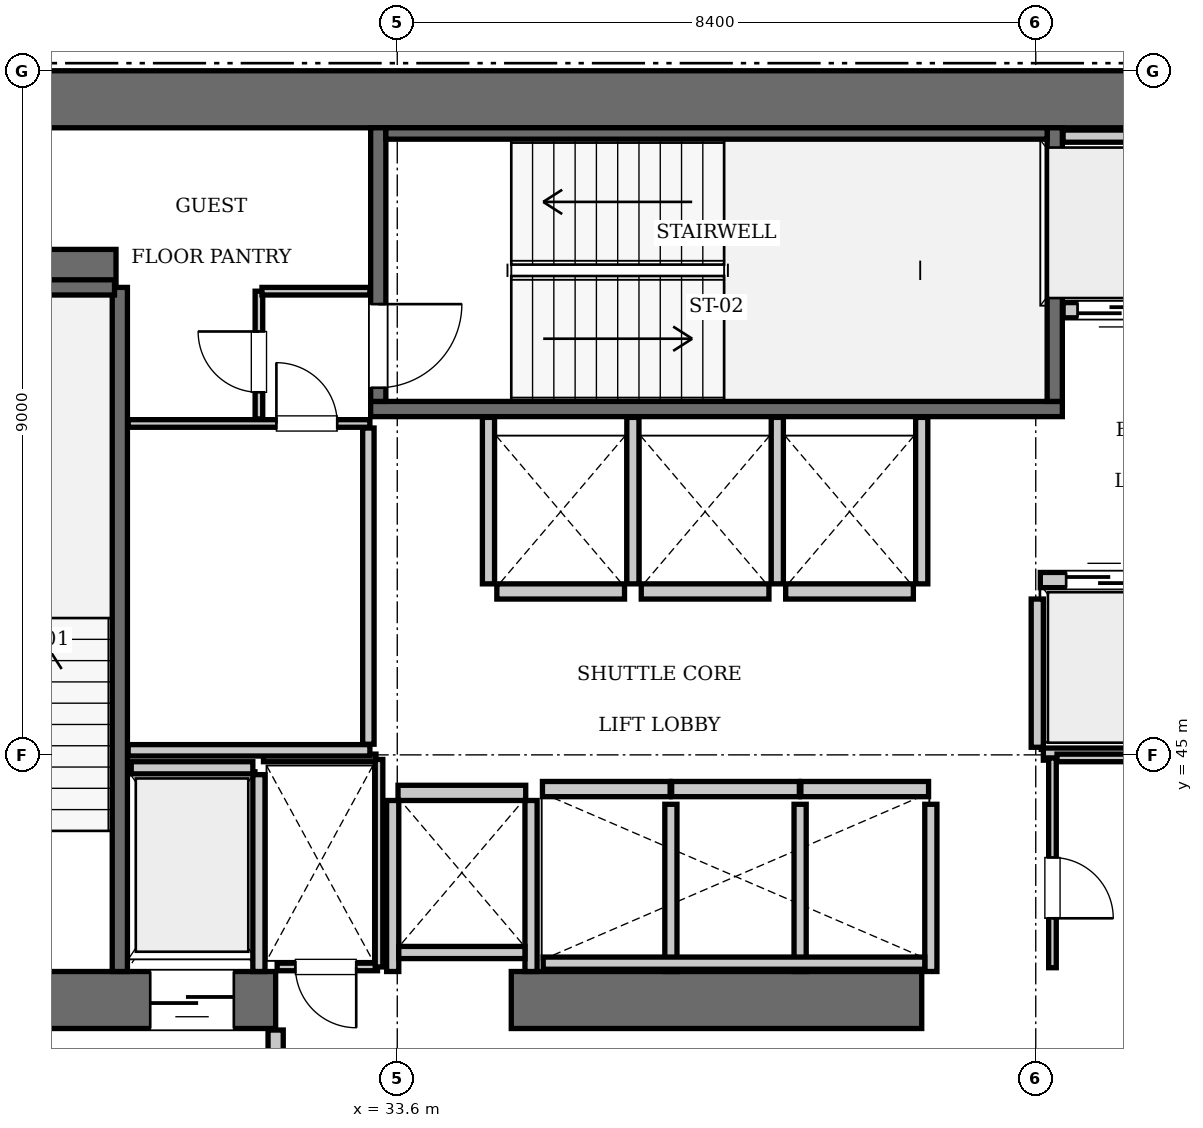
"""IFC4 building model, lengths in metres.
Left out: names, types, materials, properties, quantities, classifications, styles, units other than length and angle.
Written with IfcOpenShell. Run it as: python <this file> out.ifc"""

import sys

from ifc_helpers import new_model, si_unit, direction, frame, frame_2d, origin, place, context, subcontext, project, spatial, rectangle, extrude, element, fill, save


model = new_model("IFC4")
c1 = context("Model", 3, precision=1e-05, world=origin(), true_north=direction((0.0, 1.0)))
c2 = subcontext(c1, "Body", "Model", "MODEL_VIEW")
j1 = project(units=[si_unit("LENGTHUNIT", "METRE"), si_unit("PLANEANGLEUNIT", "RADIAN")], contexts=[c1])
p1 = place(None, origin())
s1 = spatial("IfcSite", under=j1, at=p1, CompositionType="ELEMENT")
p2 = place(p1, origin())
s2 = spatial("IfcBuilding", under=s1, at=p2, CompositionType="ELEMENT")
p3 = place(p2, frame((0.0, 0.0, 212.1)))
s3 = spatial("IfcBuildingStorey", under=s2, at=p3, CompositionType="ELEMENT", Elevation=212.1)
p4 = place(p3, frame((25.2, 53.625, 0.0), z_axis=(0.0, 0.0, 1.0), x_axis=(1.0, 0.0, 0.0)))
e1 = element("IfcWall", 1, at=p4, inside=s3, PredefinedType="SHEAR", context=c2, shape_type="SweptSolid", body=[
    extrude(rectangle(XDim=25.2, YDim=0.75, at=frame_2d((12.6, 0.0))), origin(), (0.0, 0.0, 1.0), 3.85),
])
p5 = place(p3, frame((25.2, 41.775, 0.0), z_axis=(0.0, 0.0, 1.0), x_axis=(1.0, 0.0, 0.0)))
e2 = element("IfcWall", 2, at=p5, inside=s3, PredefinedType="SHEAR", context=c2, shape_type="SweptSolid", body=[
    extrude(rectangle(XDim=6.8, YDim=0.75, at=frame_2d((3.4, 0.0))), origin(), (0.0, 0.0, 1.0), 3.85),
])
p6 = place(p5, frame((1.65, 0.0, 0.0)))
e3 = element("IfcOpeningElement", 3, at=p6, cuts=e2, PredefinedType="OPENING", context=c2, shape_type="SweptSolid", body=[
    extrude(rectangle(XDim=1.15, YDim=2.15, at=frame_2d((0.575, 1.075))), frame((0.0, 0.385, 0.0), z_axis=(0.0, -1.0, 0.0), x_axis=(1.0, 0.0, 0.0)), (0.0, 0.0, 1.0), 0.77),
])
p7 = place(p5, frame((5.15, 0.0, 0.0)))
e4 = element("IfcOpeningElement", 4, at=p7, cuts=e2, PredefinedType="OPENING", context=c2, shape_type="SweptSolid", body=[
    extrude(rectangle(XDim=1.1, YDim=2.2, at=frame_2d((0.55, 1.1))), frame((0.0, 0.385, 0.0), z_axis=(0.0, -1.0, 0.0), x_axis=(1.0, 0.0, 0.0)), (0.0, 0.0, 1.0), 0.77),
])
p8 = place(p3, frame((35.1, 41.775, 0.0), z_axis=(0.0, 0.0, 1.0), x_axis=(1.0, 0.0, 0.0)))
e5 = element("IfcWall", 5, at=p8, inside=s3, PredefinedType="SHEAR", context=c2, shape_type="SweptSolid", body=[
    extrude(rectangle(XDim=5.4, YDim=0.75, at=frame_2d((2.7, 0.0))), origin(), (0.0, 0.0, 1.0), 3.85),
])
p9 = place(p3, frame((25.95, 51.4, 0.0), z_axis=(0.0, 0.0, 1.0), x_axis=(1.0, 0.0, 0.0)))
e6 = element("IfcWall", 6, at=p9, inside=s3, PredefinedType="SHEAR", context=c2, shape_type="SweptSolid", body=[
    extrude(rectangle(XDim=3.95, YDim=0.5, at=frame_2d((1.975, 0.0))), origin(), (0.0, 0.0, 1.0), 3.85),
])
p10 = place(p3, frame((29.95, 42.15, 0.0), z_axis=(0.0, 0.0, 1.0), x_axis=(0.0, 1.0, 0.0)))
e7 = element("IfcWall", 7, at=p10, inside=s3, PredefinedType="SOLIDWALL", context=c2, shape_type="SweptSolid", body=[
    extrude(rectangle(XDim=9.0, YDim=0.2, at=frame_2d((4.5, 0.0))), origin(), (0.0, 0.0, 1.0), 3.61),
])
p11 = place(p3, frame((26.38, 51.15, 0.0), z_axis=(0.0, 0.0, 1.0), x_axis=(1.0, 0.0, 0.0)))
e8 = element("IfcWall", 8, at=p11, inside=s3, PredefinedType="SOLIDWALL", context=c2, shape_type="SweptSolid", body=[
    extrude(rectangle(XDim=3.5, YDim=0.2, at=frame_2d((1.75, 0.0))), origin(), (0.0, 0.0, 1.0), 3.61),
])
p12 = place(p3, frame((33.25, 49.55, 0.0), z_axis=(0.0, 0.0, 1.0), x_axis=(1.0, 0.0, 0.0)))
e9 = element("IfcWall", 9, at=p12, inside=s3, PredefinedType="SOLIDWALL", context=c2, shape_type="SweptSolid", body=[
    extrude(rectangle(XDim=9.1, YDim=0.2, at=frame_2d((4.55, 0.0))), origin(), (0.0, 0.0, 1.0), 3.61),
])
p13 = place(p3, frame((42.25, 49.65, 0.0), z_axis=(0.0, 0.0, 1.0), x_axis=(0.0, 1.0, 0.0)))
e10 = element("IfcWall", 10, at=p13, inside=s3, PredefinedType="SOLIDWALL", context=c2, shape_type="SweptSolid", body=[
    extrude(rectangle(XDim=3.6, YDim=0.2, at=frame_2d((1.8, 0.0))), origin(), (0.0, 0.0, 1.0), 3.61),
])
p14 = place(p3, frame((33.35, 49.65, 0.0), z_axis=(0.0, 0.0, 1.0), x_axis=(0.0, 1.0, 0.0)))
e11 = element("IfcWall", 11, at=p14, inside=s3, PredefinedType="SOLIDWALL", context=c2, shape_type="SweptSolid", body=[
    extrude(rectangle(XDim=3.6, YDim=0.2, at=frame_2d((1.8, 0.0))), origin(), (0.0, 0.0, 1.0), 3.61),
])
p15 = place(p14, frame((0.18, 0.0, 0.0)))
e12 = element("IfcOpeningElement", 12, at=p15, cuts=e11, PredefinedType="OPENING", context=c2, shape_type="SweptSolid", body=[
    extrude(rectangle(XDim=1.1, YDim=2.15, at=frame_2d((0.55, 1.075))), frame((0.0, 0.11, 0.0), z_axis=(0.0, -1.0, 0.0), x_axis=(1.0, 0.0, 0.0)), (0.0, 0.0, 1.0), 0.22),
])
p16 = place(p3, frame((33.45, 53.175, 0.0), z_axis=(0.0, 0.0, 1.0), x_axis=(1.0, 0.0, 0.0)))
e13 = element("IfcWall", 13, at=p16, inside=s3, PredefinedType="SOLIDWALL", context=c2, shape_type="SweptSolid", body=[
    extrude(rectangle(XDim=8.7, YDim=0.15, at=frame_2d((4.35, 0.0))), origin(), (0.0, 0.0, 1.0), 3.61),
])
p17 = place(p3, frame((42.06, 47.3, 0.0), z_axis=(0.0, 0.0, 1.0), x_axis=(1.0, 0.0, 0.0)))
e14 = element("IfcWall", 14, at=p17, inside=s3, PredefinedType="SOLIDWALL", context=c2, shape_type="SweptSolid", body=[
    extrude(rectangle(XDim=1.68, YDim=0.2, at=frame_2d((0.84, 0.0))), origin(), (0.0, 0.0, 1.0), 3.61),
])
p18 = place(p17, frame((0.34, 0.0, 0.0)))
e15 = element("IfcOpeningElement", 15, at=p18, cuts=e14, PredefinedType="OPENING", context=c2, shape_type="SweptSolid", body=[
    extrude(rectangle(XDim=1.0, YDim=2.15, at=frame_2d((0.5, 1.075))), frame((0.0, 0.11, 0.0), z_axis=(0.0, -1.0, 0.0), x_axis=(1.0, 0.0, 0.0)), (0.0, 0.0, 1.0), 0.22),
])
p19 = place(p3, frame((42.36, 50.85, 0.0), z_axis=(0.0, 0.0, 1.0), x_axis=(1.0, 0.0, 0.0)))
e16 = element("IfcWall", 16, at=p19, inside=s3, PredefinedType="SOLIDWALL", context=c2, shape_type="SweptSolid", body=[
    extrude(rectangle(XDim=1.38, YDim=0.2, at=frame_2d((0.69, 0.0))), origin(), (0.0, 0.0, 1.0), 3.61),
])
p20 = place(p19, frame((0.19, 0.0, 0.0)))
e17 = element("IfcOpeningElement", 17, at=p20, cuts=e16, PredefinedType="OPENING", context=c2, shape_type="SweptSolid", body=[
    extrude(rectangle(XDim=1.0, YDim=2.15, at=frame_2d((0.5, 1.075))), frame((0.0, 0.11, 0.0), z_axis=(0.0, -1.0, 0.0), x_axis=(1.0, 0.0, 0.0)), (0.0, 0.0, 1.0), 0.22),
])
for number, where, z_axis, x_axis in (
    (18, (35.51, 44.55, 0.0), (0.0, 0.0, 1.0), (1.0, 0.0, 0.0)),
    (19, (37.21, 44.55, 0.0), (0.0, 0.0, 1.0), (1.0, 0.0, 0.0)),
):
    element("IfcWall", number, at=place(p3, frame(where, z_axis=z_axis, x_axis=x_axis)), inside=s3, PredefinedType="SOLIDWALL", context=c2, shape_type="SweptSolid", body=[
        extrude(rectangle(XDim=1.68, YDim=0.2, at=frame_2d((0.84, 0.0))), origin(), (0.0, 0.0, 1.0), 3.61),
    ])
for number, where, z_axis, x_axis in (
    (20, (38.91, 44.55, 0.0), (0.0, 0.0, 1.0), (1.0, 0.0, 0.0)),
    (21, (34.91, 47.15, 0.0), (0.0, 0.0, 1.0), (1.0, 0.0, 0.0)),
):
    element("IfcWall", number, at=place(p3, frame(where, z_axis=z_axis, x_axis=x_axis)), inside=s3, PredefinedType="SOLIDWALL", context=c2, shape_type="SweptSolid", body=[
        extrude(rectangle(XDim=1.68, YDim=0.2, at=frame_2d((0.84, 0.0))), origin(), (0.0, 0.0, 1.0), 3.61),
    ])
for number, where, z_axis, x_axis in (
    (22, (36.81, 47.15, 0.0), (0.0, 0.0, 1.0), (1.0, 0.0, 0.0)),
    (23, (38.71, 47.15, 0.0), (0.0, 0.0, 1.0), (1.0, 0.0, 0.0)),
    (24, (33.61, 44.5, 0.0), (0.0, 0.0, 1.0), (1.0, 0.0, 0.0)),
):
    element("IfcWall", number, at=place(p3, frame(where, z_axis=z_axis, x_axis=x_axis)), inside=s3, PredefinedType="SOLIDWALL", context=c2, shape_type="SweptSolid", body=[
        extrude(rectangle(XDim=1.68, YDim=0.2, at=frame_2d((0.84, 0.0))), origin(), (0.0, 0.0, 1.0), 3.61),
    ])
p21 = place(p3, frame((30.1, 44.83, 0.0), z_axis=(0.0, 0.0, 1.0), x_axis=(1.0, 0.0, 0.0)))
e25 = element("IfcWall", 25, at=p21, inside=s3, PredefinedType="SOLIDWALL", context=c2, shape_type="SweptSolid", body=[
    extrude(rectangle(XDim=1.6, YDim=0.16, at=frame_2d((0.8, 0.0))), origin(), (0.0, 0.0, 1.0), 3.61),
])
p22 = place(p3, frame((31.78, 42.15, 0.0), z_axis=(0.0, 0.0, 1.0), x_axis=(0.0, 1.0, 0.0)))
e26 = element("IfcWall", 26, at=p22, inside=s3, PredefinedType="SOLIDWALL", context=c2, shape_type="SweptSolid", body=[
    extrude(rectangle(XDim=2.59, YDim=0.16, at=frame_2d((1.295, 0.0))), origin(), (0.0, 0.0, 1.0), 3.61),
])
p23 = place(p3, frame((42.02, 45.1, 0.0), z_axis=(0.0, 0.0, 1.0), x_axis=(0.0, 1.0, 0.0)))
e27 = element("IfcWall", 27, at=p23, inside=s3, PredefinedType="SOLIDWALL", context=c2, shape_type="SweptSolid", body=[
    extrude(rectangle(XDim=1.95, YDim=0.16, at=frame_2d((0.975, 0.0))), origin(), (0.0, 0.0, 1.0), 3.61),
])
p24 = place(p3, frame((42.1, 45.01, 0.0), z_axis=(0.0, 0.0, 1.0), x_axis=(1.0, 0.0, 0.0)))
e28 = element("IfcWall", 28, at=p24, inside=s3, PredefinedType="SOLIDWALL", context=c2, shape_type="SweptSolid", body=[
    extrude(rectangle(XDim=3.45, YDim=0.16, at=frame_2d((1.725, 0.0))), origin(), (0.0, 0.0, 1.0), 3.61),
])
p25 = place(p3, frame((42.36, 53.14, 0.0), z_axis=(0.0, 0.0, 1.0), x_axis=(1.0, 0.0, 0.0)))
e29 = element("IfcWall", 29, at=p25, inside=s3, PredefinedType="SOLIDWALL", context=c2, shape_type="SweptSolid", body=[
    extrude(rectangle(XDim=3.14, YDim=0.16, at=frame_2d((1.57, 0.0))), origin(), (0.0, 0.0, 1.0), 3.61),
])
for number, where, z_axis, x_axis in (
    (30, (37.2, 42.15, 0.0), (0.0, 0.0, 1.0), (0.0, 1.0, 0.0)),
    (31, (38.9, 42.15, 0.0), (0.0, 0.0, 1.0), (0.0, 1.0, 0.0)),
    (32, (40.62, 42.15, 0.0), (0.0, 0.0, 1.0), (0.0, 1.0, 0.0)),
):
    element("IfcWall", number, at=place(p3, frame(where, z_axis=z_axis, x_axis=x_axis)), inside=s3, PredefinedType="SOLIDWALL", context=c2, shape_type="SweptSolid", body=[
        extrude(rectangle(XDim=2.2, YDim=0.16, at=frame_2d((1.1, 0.0))), origin(), (0.0, 0.0, 1.0), 3.61),
    ])
p26 = place(p3, frame((35.52, 42.26, 0.0), z_axis=(0.0, 0.0, 1.0), x_axis=(1.0, 0.0, 0.0)))
e33 = element("IfcWall", 33, at=p26, inside=s3, PredefinedType="SOLIDWALL", context=c2, shape_type="SweptSolid", body=[
    extrude(rectangle(XDim=5.02, YDim=0.16, at=frame_2d((2.51, 0.0))), origin(), (0.0, 0.0, 1.0), 3.61),
])
for number, where, z_axis, x_axis in (
    (34, (34.8, 47.25, 0.0), (0.0, 0.0, 1.0), (0.0, 1.0, 0.0)),
    (35, (36.7, 47.25, 0.0), (0.0, 0.0, 1.0), (0.0, 1.0, 0.0)),
    (36, (38.6, 47.25, 0.0), (0.0, 0.0, 1.0), (0.0, 1.0, 0.0)),
    (37, (40.5, 47.25, 0.0), (0.0, 0.0, 1.0), (0.0, 1.0, 0.0)),
):
    element("IfcWall", number, at=place(p3, frame(where, z_axis=z_axis, x_axis=x_axis)), inside=s3, PredefinedType="SOLIDWALL", context=c2, shape_type="SweptSolid", body=[
        extrude(rectangle(XDim=2.19, YDim=0.16, at=frame_2d((1.095, 0.0))), origin(), (0.0, 0.0, 1.0), 3.61),
    ])
for number, where, z_axis, x_axis in (
    (38, (33.54, 42.15, 0.0), (0.0, 0.0, 1.0), (0.0, 1.0, 0.0)),
    (39, (35.36, 42.15, 0.0), (0.0, 0.0, 1.0), (0.0, 1.0, 0.0)),
):
    element("IfcWall", number, at=place(p3, frame(where, z_axis=z_axis, x_axis=x_axis)), inside=s3, PredefinedType="SOLIDWALL", context=c2, shape_type="SweptSolid", body=[
        extrude(rectangle(XDim=2.25, YDim=0.16, at=frame_2d((1.125, 0.0))), origin(), (0.0, 0.0, 1.0), 3.61),
    ])
p27 = place(p3, frame((33.62, 42.4, 0.0), z_axis=(0.0, 0.0, 1.0), x_axis=(1.0, 0.0, 0.0)))
e40 = element("IfcWall", 40, at=p27, inside=s3, PredefinedType="SOLIDWALL", context=c2, shape_type="SweptSolid", body=[
    extrude(rectangle(XDim=1.66, YDim=0.16, at=frame_2d((0.83, 0.0))), origin(), (0.0, 0.0, 1.0), 3.61),
])
p28 = place(p3, frame((32.0, 38.31, 0.0), z_axis=(0.0, 0.0, 1.0), x_axis=(0.0, 1.0, 0.0)))
e41 = element("IfcWall", 41, at=p28, inside=s3, PredefinedType="PARTITIONING", context=c2, shape_type="SweptSolid", body=[
    extrude(rectangle(XDim=3.07, YDim=0.2, at=frame_2d((1.535, 0.0))), origin(), (0.0, 0.0, 1.0), 3.61),
])
p29 = place(p3, frame((32.02, 42.21, 0.0), z_axis=(0.0, 0.0, 1.0), x_axis=(1.0, 0.0, 0.0)))
e42 = element("IfcWall", 42, at=p29, inside=s3, PredefinedType="PARTITIONING", context=c2, shape_type="SweptSolid", body=[
    extrude(rectangle(XDim=1.32, YDim=0.1, at=frame_2d((0.66, 0.0))), origin(), (0.0, 0.0, 1.0), 3.61),
])
p30 = place(p29, frame((0.24, 0.0, 0.0)))
e43 = element("IfcOpeningElement", 43, at=p30, cuts=e42, PredefinedType="OPENING", context=c2, shape_type="SweptSolid", body=[
    extrude(rectangle(XDim=0.8, YDim=2.05, at=frame_2d((0.4, 1.025))), frame((0.0, 0.06, 0.0), z_axis=(0.0, -1.0, 0.0), x_axis=(1.0, 0.0, 0.0)), (0.0, 0.0, 1.0), 0.12),
])
p31 = place(p3, frame((31.84, 44.96, 0.0), z_axis=(0.0, 0.0, 1.0), x_axis=(1.0, 0.0, 0.0)))
e44 = element("IfcWall", 44, at=p31, inside=s3, PredefinedType="PARTITIONING", context=c2, shape_type="SweptSolid", body=[
    extrude(rectangle(XDim=1.48, YDim=0.1, at=frame_2d((0.74, 0.0))), origin(), (0.0, 0.0, 1.0), 3.61),
])
p32 = place(p3, frame((33.36, 42.21, 0.0), z_axis=(0.0, 0.0, 1.0), x_axis=(0.0, 1.0, 0.0)))
e45 = element("IfcWall", 45, at=p32, inside=s3, PredefinedType="PARTITIONING", context=c2, shape_type="SweptSolid", body=[
    extrude(rectangle(XDim=2.73, YDim=0.1, at=frame_2d((1.365, 0.0))), origin(), (0.0, 0.0, 1.0), 3.61),
])
p33 = place(p3, frame((42.22, 42.2, 0.0), z_axis=(0.0, 0.0, 1.0), x_axis=(0.0, 1.0, 0.0)))
e46 = element("IfcWall", 46, at=p33, inside=s3, PredefinedType="PARTITIONING", context=c2, shape_type="SweptSolid", body=[
    extrude(rectangle(XDim=2.76, YDim=0.1, at=frame_2d((1.38, 0.0))), origin(), (0.0, 0.0, 1.0), 3.61),
])
p34 = place(p33, frame((0.65, 0.0, 0.0)))
e47 = element("IfcOpeningElement", 47, at=p34, cuts=e46, PredefinedType="OPENING", context=c2, shape_type="SweptSolid", body=[
    extrude(rectangle(XDim=0.8, YDim=2.05, at=frame_2d((0.4, 1.025))), frame((0.0, 0.06, 0.0), z_axis=(0.0, -1.0, 0.0), x_axis=(1.0, 0.0, 0.0)), (0.0, 0.0, 1.0), 0.12),
])
p35 = place(p3, frame((42.28, 44.96, 0.0), z_axis=(0.0, 0.0, 1.0), x_axis=(1.0, 0.0, 0.0)))
e48 = element("IfcWall", 48, at=p35, inside=s3, PredefinedType="PARTITIONING", context=c2, shape_type="SweptSolid", body=[
    extrude(rectangle(XDim=1.3, YDim=0.1, at=frame_2d((0.65, 0.0))), origin(), (0.0, 0.0, 1.0), 3.61),
])
p36 = place(p3, frame((30.06, 45.06, 0.0), z_axis=(0.0, 0.0, 1.0), x_axis=(1.0, 0.0, 0.0)))
e49 = element("IfcWall", 49, at=p36, inside=s3, PredefinedType="PARTITIONING", context=c2, shape_type="SweptSolid", body=[
    extrude(rectangle(XDim=3.18, YDim=0.15, at=frame_2d((1.59, 0.0))), origin(), (0.0, 0.0, 1.0), 3.61),
])
p37 = place(p3, frame((33.22, 45.14, 0.0), z_axis=(0.0, 0.0, 1.0), x_axis=(0.0, 1.0, 0.0)))
e50 = element("IfcWall", 50, at=p37, inside=s3, PredefinedType="PARTITIONING", context=c2, shape_type="SweptSolid", body=[
    extrude(rectangle(XDim=4.16, YDim=0.15, at=frame_2d((2.08, 0.0))), origin(), (0.0, 0.0, 1.0), 3.61),
])
p38 = place(p3, frame((30.06, 49.36, 0.0), z_axis=(0.0, 0.0, 1.0), x_axis=(1.0, 0.0, 0.0)))
e51 = element("IfcWall", 51, at=p38, inside=s3, PredefinedType="PARTITIONING", context=c2, shape_type="SweptSolid", body=[
    extrude(rectangle(XDim=3.18, YDim=0.1, at=frame_2d((1.59, 0.0))), origin(), (0.0, 0.0, 1.0), 3.61),
])
p39 = place(p38, frame((1.95, 0.0, 0.0)))
e52 = element("IfcOpeningElement", 52, at=p39, cuts=e51, PredefinedType="OPENING", context=c2, shape_type="SweptSolid", body=[
    extrude(rectangle(XDim=0.8, YDim=2.05, at=frame_2d((0.4, 1.025))), frame((0.0, 0.06, 0.0), z_axis=(0.0, -1.0, 0.0), x_axis=(1.0, 0.0, 0.0)), (0.0, 0.0, 1.0), 0.12),
])
p40 = place(p3, frame((31.78, 49.42, 0.0), z_axis=(0.0, 0.0, 1.0), x_axis=(0.0, 1.0, 0.0)))
e53 = element("IfcWall", 53, at=p40, inside=s3, PredefinedType="PARTITIONING", context=c2, shape_type="SweptSolid", body=[
    extrude(rectangle(XDim=1.68, YDim=0.1, at=frame_2d((0.84, 0.0))), origin(), (0.0, 0.0, 1.0), 3.61),
])
p41 = place(p40, frame((0.35, 0.0, 0.0)))
e54 = element("IfcOpeningElement", 54, at=p41, cuts=e53, PredefinedType="OPENING", context=c2, shape_type="SweptSolid", body=[
    extrude(rectangle(XDim=0.8, YDim=2.05, at=frame_2d((0.4, 1.025))), frame((0.0, 0.06, 0.0), z_axis=(0.0, -1.0, 0.0), x_axis=(1.0, 0.0, 0.0)), (0.0, 0.0, 1.0), 0.12),
])
p42 = place(p3, frame((31.82, 51.1, 0.0), z_axis=(0.0, 0.0, 1.0), x_axis=(1.0, 0.0, 0.0)))
e55 = element("IfcWall", 55, at=p42, inside=s3, PredefinedType="PARTITIONING", context=c2, shape_type="SweptSolid", body=[
    extrude(rectangle(XDim=1.42, YDim=0.1, at=frame_2d((0.71, 0.0))), origin(), (0.0, 0.0, 1.0), 3.61),
])
p43 = place(p15, frame((1.1, 0.0, 0.0), z_axis=(0.0, 0.0, 1.0), x_axis=(-1.0, 0.0, 0.0)))
e56 = element("IfcDoor", 56, at=p43, inside=s3, OperationType="SINGLE_SWING_LEFT", PredefinedType="DOOR", context=c2, shape_type="SweptSolid", body=[
    extrude(rectangle(XDim=1.1, YDim=2.15, at=frame_2d((0.55, 1.075))), frame((0.0, 0.025, 0.0), z_axis=(0.0, -1.0, 0.0), x_axis=(1.0, 0.0, 0.0)), (0.0, 0.0, 1.0), 0.05),
])
fill(e12, e56)
p44 = place(p18, origin())
e57 = element("IfcDoor", 57, at=p44, inside=s3, OperationType="SLIDING_TO_LEFT", PredefinedType="DOOR", context=c2, shape_type="SweptSolid", body=[
    extrude(rectangle(XDim=1.0, YDim=2.15, at=frame_2d((0.5, 1.075))), frame((0.0, 0.025, 0.0), z_axis=(0.0, -1.0, 0.0), x_axis=(1.0, 0.0, 0.0)), (0.0, 0.0, 1.0), 0.05),
])
fill(e15, e57)
p45 = place(p20, frame((1.0, 0.0, 0.0), z_axis=(0.0, 0.0, 1.0), x_axis=(-1.0, 0.0, 0.0)))
e58 = element("IfcDoor", 58, at=p45, inside=s3, OperationType="SLIDING_TO_LEFT", PredefinedType="DOOR", context=c2, shape_type="SweptSolid", body=[
    extrude(rectangle(XDim=1.0, YDim=2.15, at=frame_2d((0.5, 1.075))), frame((0.0, 0.025, 0.0), z_axis=(0.0, -1.0, 0.0), x_axis=(1.0, 0.0, 0.0)), (0.0, 0.0, 1.0), 0.05),
])
fill(e17, e58)
p46 = place(p7, frame((1.1, 0.0, 0.0), z_axis=(0.0, 0.0, 1.0), x_axis=(-1.0, 0.0, 0.0)))
e59 = element("IfcDoor", 59, at=p46, inside=s3, OperationType="SLIDING_TO_LEFT", PredefinedType="DOOR", context=c2, shape_type="SweptSolid", body=[
    extrude(rectangle(XDim=1.1, YDim=2.2, at=frame_2d((0.55, 1.1))), frame((0.0, 0.025, 0.0), z_axis=(0.0, -1.0, 0.0), x_axis=(1.0, 0.0, 0.0)), (0.0, 0.0, 1.0), 0.05),
])
fill(e4, e59)
p47 = place(p30, frame((0.8, 0.0, 0.0), z_axis=(0.0, 0.0, 1.0), x_axis=(-1.0, 0.0, 0.0)))
e60 = element("IfcDoor", 60, at=p47, inside=s3, OperationType="SINGLE_SWING_LEFT", PredefinedType="DOOR", context=c2, shape_type="SweptSolid", body=[
    extrude(rectangle(XDim=0.8, YDim=2.05, at=frame_2d((0.4, 1.025))), frame((0.0, 0.025, 0.0), z_axis=(0.0, -1.0, 0.0), x_axis=(1.0, 0.0, 0.0)), (0.0, 0.0, 1.0), 0.05),
])
fill(e43, e60)
p48 = place(p34, frame((0.8, 0.0, 0.0), z_axis=(0.0, 0.0, 1.0), x_axis=(-1.0, 0.0, 0.0)))
e61 = element("IfcDoor", 61, at=p48, inside=s3, OperationType="SINGLE_SWING_RIGHT", PredefinedType="DOOR", context=c2, shape_type="SweptSolid", body=[
    extrude(rectangle(XDim=0.8, YDim=2.05, at=frame_2d((0.4, 1.025))), frame((0.0, 0.025, 0.0), z_axis=(0.0, -1.0, 0.0), x_axis=(1.0, 0.0, 0.0)), (0.0, 0.0, 1.0), 0.05),
])
fill(e47, e61)
p49 = place(p39, origin())
e62 = element("IfcDoor", 62, at=p49, inside=s3, OperationType="SINGLE_SWING_LEFT", PredefinedType="DOOR", context=c2, shape_type="SweptSolid", body=[
    extrude(rectangle(XDim=0.8, YDim=2.05, at=frame_2d((0.4, 1.025))), frame((0.0, 0.025, 0.0), z_axis=(0.0, -1.0, 0.0), x_axis=(1.0, 0.0, 0.0)), (0.0, 0.0, 1.0), 0.05),
])
fill(e52, e62)
p50 = place(p41, origin())
e63 = element("IfcDoor", 63, at=p50, inside=s3, OperationType="SINGLE_SWING_RIGHT", PredefinedType="DOOR", context=c2, shape_type="SweptSolid", body=[
    extrude(rectangle(XDim=0.8, YDim=2.05, at=frame_2d((0.4, 1.025))), frame((0.0, 0.025, 0.0), z_axis=(0.0, -1.0, 0.0), x_axis=(1.0, 0.0, 0.0)), (0.0, 0.0, 1.0), 0.05),
])
fill(e54, e63)
save(model, sys.argv[1])
